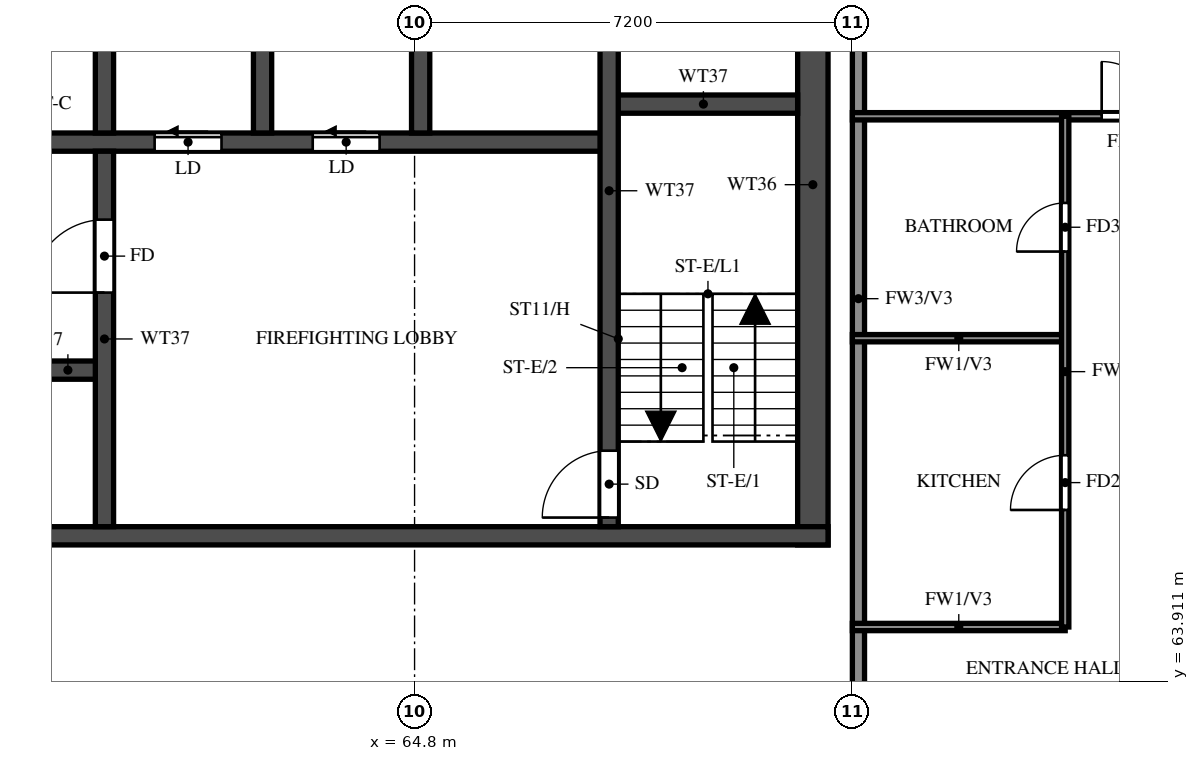
"""IFC4 building model, lengths in metres.
Left out: names, types, materials, properties, quantities, classifications, styles, units other than length and angle.
Written with IfcOpenShell. Run it as: python <this file> out.ifc"""

import sys

from ifc_helpers import new_model, si_unit, direction, frame, frame_2d, origin, place, context, subcontext, project, spatial, rectangle, extrude, element, fill, save


model = new_model("IFC4")
c1 = context("Model", 3, precision=1e-05, world=origin(), true_north=direction((0.0, 1.0)))
c2 = subcontext(c1, "Body", "Model", "MODEL_VIEW")
j1 = project(units=[si_unit("LENGTHUNIT", "METRE"), si_unit("PLANEANGLEUNIT", "RADIAN")], contexts=[c1])
p1 = place(None, origin())
s1 = spatial("IfcSite", under=j1, at=p1, CompositionType="ELEMENT")
p2 = place(p1, origin())
s2 = spatial("IfcBuilding", under=s1, at=p2, CompositionType="ELEMENT")
p3 = place(p2, frame((0.0, 0.0, 225.5)))
s3 = spatial("IfcBuildingStorey", under=s2, at=p3, CompositionType="ELEMENT", Elevation=225.5)
p4 = place(p3, frame((71.35, 66.15, 0.0), z_axis=(0.0, 0.0, 1.0), x_axis=(0.0, 1.0, 0.0)))
e1 = element("IfcWall", 1, at=p4, inside=s3, PredefinedType="SHEAR", context=c2, shape_type="SweptSolid", body=[
    extrude(rectangle(XDim=11.85, YDim=0.5, at=frame_2d((5.925, 0.0))), origin(), (0.0, 0.0, 1.0), 3.22),
])
p5 = place(p3, frame((29.2, 66.3, 0.0), z_axis=(0.0, 0.0, 1.0), x_axis=(1.0, 0.0, 0.0)))
e2 = element("IfcWall", 2, at=p5, inside=s3, PredefinedType="SHEAR", context=c2, shape_type="SweptSolid", body=[
    extrude(rectangle(XDim=42.4, YDim=0.3, at=frame_2d((21.2, 0.0))), origin(), (0.0, 0.0, 1.0), 3.22),
])
p6 = place(p5, frame((1.425, 0.0, 0.0)))
e3 = element("IfcOpeningElement", 3, at=p6, cuts=e2, PredefinedType="OPENING", context=c2, shape_type="SweptSolid", body=[
    extrude(rectangle(XDim=1.1, YDim=2.1, at=frame_2d((0.55, 1.05))), frame((0.0, 0.16, 0.0), z_axis=(0.0, -1.0, 0.0), x_axis=(1.0, 0.0, 0.0)), (0.0, 0.0, 1.0), 0.32),
])
p7 = place(p5, frame((4.2, 0.0, 0.0)))
e4 = element("IfcOpeningElement", 4, at=p7, cuts=e2, PredefinedType="OPENING", context=c2, shape_type="SweptSolid", body=[
    extrude(rectangle(XDim=1.8, YDim=2.1, at=frame_2d((0.9, 1.05))), frame((0.0, 0.16, 0.0), z_axis=(0.0, -1.0, 0.0), x_axis=(1.0, 0.0, 0.0)), (0.0, 0.0, 1.0), 0.32),
])
p8 = place(p3, frame((35.65, 69.025, 0.0), z_axis=(0.0, 0.0, 1.0), x_axis=(1.0, 0.0, 0.0)))
e5 = element("IfcWall", 5, at=p8, inside=s3, PredefinedType="SHEAR", context=c2, shape_type="SweptSolid", body=[
    extrude(rectangle(XDim=24.05, YDim=0.3, at=frame_2d((12.025, 0.0))), origin(), (0.0, 0.0, 1.0), 3.22),
])
p9 = place(p8, frame((0.975, 0.0, 0.0)))
e6 = element("IfcOpeningElement", 6, at=p9, cuts=e5, PredefinedType="OPENING", context=c2, shape_type="SweptSolid", body=[
    extrude(rectangle(XDim=1.1, YDim=2.1, at=frame_2d((0.55, 1.05))), frame((0.0, 0.16, 0.0), z_axis=(0.0, -1.0, 0.0), x_axis=(1.0, 0.0, 0.0)), (0.0, 0.0, 1.0), 0.32),
])
p10 = place(p8, frame((3.725, 0.0, 0.0)))
e7 = element("IfcOpeningElement", 7, at=p10, cuts=e5, PredefinedType="OPENING", context=c2, shape_type="SweptSolid", body=[
    extrude(rectangle(XDim=1.1, YDim=2.1, at=frame_2d((0.55, 1.05))), frame((0.0, 0.16, 0.0), z_axis=(0.0, -1.0, 0.0), x_axis=(1.0, 0.0, 0.0)), (0.0, 0.0, 1.0), 0.32),
])
p11 = place(p8, frame((6.475, 0.0, 0.0)))
e8 = element("IfcOpeningElement", 8, at=p11, cuts=e5, PredefinedType="OPENING", context=c2, shape_type="SweptSolid", body=[
    extrude(rectangle(XDim=1.1, YDim=2.1, at=frame_2d((0.55, 1.05))), frame((0.0, 0.16, 0.0), z_axis=(0.0, -1.0, 0.0), x_axis=(1.0, 0.0, 0.0)), (0.0, 0.0, 1.0), 0.32),
])
p12 = place(p8, frame((9.225, 0.0, 0.0)))
e9 = element("IfcOpeningElement", 9, at=p12, cuts=e5, PredefinedType="OPENING", context=c2, shape_type="SweptSolid", body=[
    extrude(rectangle(XDim=1.1, YDim=2.1, at=frame_2d((0.55, 1.05))), frame((0.0, 0.16, 0.0), z_axis=(0.0, -1.0, 0.0), x_axis=(1.0, 0.0, 0.0)), (0.0, 0.0, 1.0), 0.32),
])
p13 = place(p8, frame((11.975, 0.0, 0.0)))
e10 = element("IfcOpeningElement", 10, at=p13, cuts=e5, PredefinedType="OPENING", context=c2, shape_type="SweptSolid", body=[
    extrude(rectangle(XDim=1.1, YDim=2.1, at=frame_2d((0.55, 1.05))), frame((0.0, 0.16, 0.0), z_axis=(0.0, -1.0, 0.0), x_axis=(1.0, 0.0, 0.0)), (0.0, 0.0, 1.0), 0.32),
])
p14 = place(p8, frame((14.725, 0.0, 0.0)))
e11 = element("IfcOpeningElement", 11, at=p14, cuts=e5, PredefinedType="OPENING", context=c2, shape_type="SweptSolid", body=[
    extrude(rectangle(XDim=1.1, YDim=2.1, at=frame_2d((0.55, 1.05))), frame((0.0, 0.16, 0.0), z_axis=(0.0, -1.0, 0.0), x_axis=(1.0, 0.0, 0.0)), (0.0, 0.0, 1.0), 0.32),
])
p15 = place(p8, frame((17.6, 0.0, 0.0)))
e12 = element("IfcOpeningElement", 12, at=p15, cuts=e5, PredefinedType="OPENING", context=c2, shape_type="SweptSolid", body=[
    extrude(rectangle(XDim=1.1, YDim=2.1, at=frame_2d((0.55, 1.05))), frame((0.0, 0.16, 0.0), z_axis=(0.0, -1.0, 0.0), x_axis=(1.0, 0.0, 0.0)), (0.0, 0.0, 1.0), 0.32),
])
p16 = place(p8, frame((20.6, 0.0, 0.0)))
e13 = element("IfcOpeningElement", 13, at=p16, cuts=e5, PredefinedType="OPENING", context=c2, shape_type="SweptSolid", body=[
    extrude(rectangle(XDim=1.1, YDim=2.1, at=frame_2d((0.55, 1.05))), frame((0.0, 0.16, 0.0), z_axis=(0.0, -1.0, 0.0), x_axis=(1.0, 0.0, 0.0)), (0.0, 0.0, 1.0), 0.32),
])
p17 = place(p3, frame((32.8, 72.775, 0.0), z_axis=(0.0, 0.0, 1.0), x_axis=(1.0, 0.0, 0.0)))
e14 = element("IfcWall", 14, at=p17, inside=s3, PredefinedType="SHEAR", context=c2, shape_type="SweptSolid", body=[
    extrude(rectangle(XDim=35.2, YDim=0.3, at=frame_2d((17.6, 0.0))), origin(), (0.0, 0.0, 1.0), 3.22),
])
p18 = place(p17, frame((19.8, 0.0, 0.0)))
e15 = element("IfcOpeningElement", 15, at=p18, cuts=e14, PredefinedType="OPENING", context=c2, shape_type="SweptSolid", body=[
    extrude(rectangle(XDim=1.1, YDim=2.1, at=frame_2d((0.55, 1.05))), frame((0.0, 0.16, 0.0), z_axis=(0.0, -1.0, 0.0), x_axis=(1.0, 0.0, 0.0)), (0.0, 0.0, 1.0), 0.32),
])
p19 = place(p17, frame((27.725, 0.0, 0.0)))
e16 = element("IfcOpeningElement", 16, at=p19, cuts=e14, PredefinedType="OPENING", context=c2, shape_type="SweptSolid", body=[
    extrude(rectangle(XDim=1.1, YDim=2.1, at=frame_2d((0.55, 1.05))), frame((0.0, 0.16, 0.0), z_axis=(0.0, -1.0, 0.0), x_axis=(1.0, 0.0, 0.0)), (0.0, 0.0, 1.0), 0.32),
])
p20 = place(p17, frame((30.325, 0.0, 0.0)))
e17 = element("IfcOpeningElement", 17, at=p20, cuts=e14, PredefinedType="OPENING", context=c2, shape_type="SweptSolid", body=[
    extrude(rectangle(XDim=1.1, YDim=2.1, at=frame_2d((0.55, 1.05))), frame((0.0, 0.16, 0.0), z_axis=(0.0, -1.0, 0.0), x_axis=(1.0, 0.0, 0.0)), (0.0, 0.0, 1.0), 0.32),
])
p21 = place(p17, frame((3.825, 0.0, 0.0)))
e18 = element("IfcOpeningElement", 18, at=p21, cuts=e14, PredefinedType="OPENING", context=c2, shape_type="SweptSolid", body=[
    extrude(rectangle(XDim=1.1, YDim=2.1, at=frame_2d((0.55, 1.05))), frame((0.0, 0.16, 0.0), z_axis=(0.0, -1.0, 0.0), x_axis=(1.0, 0.0, 0.0)), (0.0, 0.0, 1.0), 0.32),
])
p22 = place(p17, frame((6.575, 0.0, 0.0)))
e19 = element("IfcOpeningElement", 19, at=p22, cuts=e14, PredefinedType="OPENING", context=c2, shape_type="SweptSolid", body=[
    extrude(rectangle(XDim=1.1, YDim=2.1, at=frame_2d((0.55, 1.05))), frame((0.0, 0.16, 0.0), z_axis=(0.0, -1.0, 0.0), x_axis=(1.0, 0.0, 0.0)), (0.0, 0.0, 1.0), 0.32),
])
p23 = place(p17, frame((9.325, 0.0, 0.0)))
e20 = element("IfcOpeningElement", 20, at=p23, cuts=e14, PredefinedType="OPENING", context=c2, shape_type="SweptSolid", body=[
    extrude(rectangle(XDim=1.1, YDim=2.1, at=frame_2d((0.55, 1.05))), frame((0.0, 0.16, 0.0), z_axis=(0.0, -1.0, 0.0), x_axis=(1.0, 0.0, 0.0)), (0.0, 0.0, 1.0), 0.32),
])
p24 = place(p17, frame((12.075, 0.0, 0.0)))
e21 = element("IfcOpeningElement", 21, at=p24, cuts=e14, PredefinedType="OPENING", context=c2, shape_type="SweptSolid", body=[
    extrude(rectangle(XDim=1.1, YDim=2.1, at=frame_2d((0.55, 1.05))), frame((0.0, 0.16, 0.0), z_axis=(0.0, -1.0, 0.0), x_axis=(1.0, 0.0, 0.0)), (0.0, 0.0, 1.0), 0.32),
])
p25 = place(p17, frame((14.825, 0.0, 0.0)))
e22 = element("IfcOpeningElement", 22, at=p25, cuts=e14, PredefinedType="OPENING", context=c2, shape_type="SweptSolid", body=[
    extrude(rectangle(XDim=1.1, YDim=2.1, at=frame_2d((0.55, 1.05))), frame((0.0, 0.16, 0.0), z_axis=(0.0, -1.0, 0.0), x_axis=(1.0, 0.0, 0.0)), (0.0, 0.0, 1.0), 0.32),
])
p26 = place(p17, frame((17.575, 0.0, 0.0)))
e23 = element("IfcOpeningElement", 23, at=p26, cuts=e14, PredefinedType="OPENING", context=c2, shape_type="SweptSolid", body=[
    extrude(rectangle(XDim=1.1, YDim=2.1, at=frame_2d((0.55, 1.05))), frame((0.0, 0.16, 0.0), z_axis=(0.0, -1.0, 0.0), x_axis=(1.0, 0.0, 0.0)), (0.0, 0.0, 1.0), 0.32),
])
p27 = place(p17, frame((0.95, 0.0, 0.0)))
e24 = element("IfcOpeningElement", 24, at=p27, cuts=e14, PredefinedType="OPENING", context=c2, shape_type="SweptSolid", body=[
    extrude(rectangle(XDim=1.1, YDim=2.1, at=frame_2d((0.55, 1.05))), frame((0.0, 0.16, 0.0), z_axis=(0.0, -1.0, 0.0), x_axis=(1.0, 0.0, 0.0)), (0.0, 0.0, 1.0), 0.32),
])
p28 = place(p3, frame((68.0, 73.4, 0.0), z_axis=(0.0, 0.0, 1.0), x_axis=(1.0, 0.0, 0.0)))
e25 = element("IfcWall", 25, at=p28, inside=s3, PredefinedType="SHEAR", context=c2, shape_type="SweptSolid", body=[
    extrude(rectangle(XDim=3.1, YDim=0.3, at=frame_2d((1.55, 0.0))), origin(), (0.0, 0.0, 1.0), 3.22),
])
p29 = place(p3, frame((68.0, 66.45, 0.0), z_axis=(0.0, 0.0, 1.0), x_axis=(0.0, 1.0, 0.0)))
e26 = element("IfcWall", 26, at=p29, inside=s3, PredefinedType="SHEAR", context=c2, shape_type="SweptSolid", body=[
    extrude(rectangle(XDim=11.05, YDim=0.3, at=frame_2d((5.525, 0.0))), origin(), (0.0, 0.0, 1.0), 3.22),
])
p30 = place(p29, frame((0.15, 0.0, 0.0)))
e27 = element("IfcOpeningElement", 27, at=p30, cuts=e26, PredefinedType="OPENING", context=c2, shape_type="SweptSolid", body=[
    extrude(rectangle(XDim=1.1, YDim=2.1, at=frame_2d((0.55, 1.05))), frame((0.0, 0.16, 0.0), z_axis=(0.0, -1.0, 0.0), x_axis=(1.0, 0.0, 0.0)), (0.0, 0.0, 1.0), 0.32),
])
p31 = place(p3, frame((59.7, 66.45, 0.0), z_axis=(0.0, 0.0, 1.0), x_axis=(0.0, 1.0, 0.0)))
e28 = element("IfcWall", 28, at=p31, inside=s3, PredefinedType="SHEAR", context=c2, shape_type="SweptSolid", body=[
    extrude(rectangle(XDim=6.175, YDim=0.3, at=frame_2d((3.087, 0.0))), origin(), (0.0, 0.0, 1.0), 3.22),
])
p32 = place(p31, frame((3.85, 0.0, 0.0)))
e29 = element("IfcOpeningElement", 29, at=p32, cuts=e28, PredefinedType="OPENING", context=c2, shape_type="SweptSolid", body=[
    extrude(rectangle(XDim=1.2, YDim=2.1, at=frame_2d((0.6, 1.05))), frame((0.0, 0.16, 0.0), z_axis=(0.0, -1.0, 0.0), x_axis=(1.0, 0.0, 0.0)), (0.0, 0.0, 1.0), 0.32),
])
for number, where, z_axis, x_axis in (
    (30, (59.7, 72.925, 0.0), (0.0, 0.0, 1.0), (0.0, 1.0, 0.0)),
    (31, (62.3, 72.925, 0.0), (0.0, 0.0, 1.0), (0.0, 1.0, 0.0)),
    (32, (64.9, 72.925, 0.0), (0.0, 0.0, 1.0), (0.0, 1.0, 0.0)),
):
    element("IfcWall", number, at=place(p3, frame(where, z_axis=z_axis, x_axis=x_axis)), inside=s3, PredefinedType="SHEAR", context=c2, shape_type="SweptSolid", body=[
        extrude(rectangle(XDim=2.95, YDim=0.3, at=frame_2d((1.475, 0.0))), origin(), (0.0, 0.0, 1.0), 3.22),
    ])
p33 = place(p3, frame((72.1, 62.4, 0.0), z_axis=(0.0, 0.0, 1.0), x_axis=(0.0, 1.0, 0.0)))
e33 = element("IfcWall", 33, at=p33, inside=s3, PredefinedType="SOLIDWALL", context=c2, shape_type="SweptSolid", body=[
    extrude(rectangle(XDim=15.6, YDim=0.2, at=frame_2d((7.8, 0.0))), origin(), (0.0, 0.0, 1.0), 3.22),
])
for number, where, z_axis, x_axis in (
    (34, (72.0, 64.8, 0.0), (0.0, 0.0, 1.0), (1.0, 0.0, 0.0)),
    (35, (72.0, 69.55, 0.0), (0.0, 0.0, 1.0), (1.0, 0.0, 0.0)),
):
    element("IfcWall", number, at=place(p3, frame(where, z_axis=z_axis, x_axis=x_axis)), inside=s3, PredefinedType="PARTITIONING", context=c2, shape_type="SweptSolid", body=[
        extrude(rectangle(XDim=3.5, YDim=0.12, at=frame_2d((1.75, 0.0))), origin(), (0.0, 0.0, 1.0), 3.22),
    ])
p34 = place(p3, frame((72.0, 73.2, 0.0), z_axis=(0.0, 0.0, 1.0), x_axis=(1.0, 0.0, 0.0)))
e36 = element("IfcWall", 36, at=p34, inside=s3, PredefinedType="PARTITIONING", context=c2, shape_type="SweptSolid", body=[
    extrude(rectangle(XDim=10.275, YDim=0.12, at=frame_2d((5.137, 0.0))), origin(), (0.0, 0.0, 1.0), 2.32),
])
p35 = place(p34, frame((4.1, 0.0, 0.0)))
e37 = element("IfcOpeningElement", 37, at=p35, cuts=e36, PredefinedType="OPENING", context=c2, shape_type="SweptSolid", body=[
    extrude(rectangle(XDim=0.9, YDim=2.1, at=frame_2d((0.45, 1.05))), frame((0.0, 0.07, 0.0), z_axis=(0.0, -1.0, 0.0), x_axis=(1.0, 0.0, 0.0)), (0.0, 0.0, 1.0), 0.14),
])
p36 = place(p3, frame((75.5, 64.8, 0.0), z_axis=(0.0, 0.0, 1.0), x_axis=(0.0, 1.0, 0.0)))
e38 = element("IfcWall", 38, at=p36, inside=s3, PredefinedType="PARTITIONING", context=c2, shape_type="SweptSolid", body=[
    extrude(rectangle(XDim=8.4, YDim=0.12, at=frame_2d((4.2, 0.0))), origin(), (0.0, 0.0, 1.0), 3.22),
])
p37 = place(p36, frame((1.925, 0.0, 0.0)))
e39 = element("IfcOpeningElement", 39, at=p37, cuts=e38, PredefinedType="OPENING", context=c2, shape_type="SweptSolid", body=[
    extrude(rectangle(XDim=0.9, YDim=2.1, at=frame_2d((0.45, 1.05))), frame((0.0, 0.07, 0.0), z_axis=(0.0, -1.0, 0.0), x_axis=(1.0, 0.0, 0.0)), (0.0, 0.0, 1.0), 0.14),
])
p38 = place(p36, frame((6.175, 0.0, 0.0)))
e40 = element("IfcOpeningElement", 40, at=p38, cuts=e38, PredefinedType="OPENING", context=c2, shape_type="SweptSolid", body=[
    extrude(rectangle(XDim=0.8, YDim=2.1, at=frame_2d((0.4, 1.05))), frame((0.0, 0.07, 0.0), z_axis=(0.0, -1.0, 0.0), x_axis=(1.0, 0.0, 0.0)), (0.0, 0.0, 1.0), 0.14),
])
p39 = place(p30, origin())
e41 = element("IfcDoor", 41, at=p39, inside=s3, OperationType="SINGLE_SWING_RIGHT", PredefinedType="DOOR", context=c2, shape_type="SweptSolid", body=[
    extrude(rectangle(XDim=1.1, YDim=2.1, at=frame_2d((0.55, 1.05))), frame((0.0, 0.025, 0.0), z_axis=(0.0, -1.0, 0.0), x_axis=(1.0, 0.0, 0.0)), (0.0, 0.0, 1.0), 0.05),
])
fill(e27, e41)
p40 = place(p32, origin())
e42 = element("IfcDoor", 42, at=p40, inside=s3, OperationType="SINGLE_SWING_LEFT", PredefinedType="DOOR", context=c2, shape_type="SweptSolid", body=[
    extrude(rectangle(XDim=1.2, YDim=2.1, at=frame_2d((0.6, 1.05))), frame((0.0, 0.025, 0.0), z_axis=(0.0, -1.0, 0.0), x_axis=(1.0, 0.0, 0.0)), (0.0, 0.0, 1.0), 0.05),
])
fill(e29, e42)
p41 = place(p19, origin())
e43 = element("IfcDoor", 43, at=p41, inside=s3, OperationType="SLIDING_TO_LEFT", PredefinedType="DOOR", context=c2, shape_type="SweptSolid", body=[
    extrude(rectangle(XDim=1.1, YDim=2.1, at=frame_2d((0.55, 1.05))), frame((0.0, 0.025, 0.0), z_axis=(0.0, -1.0, 0.0), x_axis=(1.0, 0.0, 0.0)), (0.0, 0.0, 1.0), 0.05),
])
fill(e16, e43)
p42 = place(p20, origin())
e44 = element("IfcDoor", 44, at=p42, inside=s3, OperationType="SLIDING_TO_LEFT", PredefinedType="DOOR", context=c2, shape_type="SweptSolid", body=[
    extrude(rectangle(XDim=1.1, YDim=2.1, at=frame_2d((0.55, 1.05))), frame((0.0, 0.025, 0.0), z_axis=(0.0, -1.0, 0.0), x_axis=(1.0, 0.0, 0.0)), (0.0, 0.0, 1.0), 0.05),
])
fill(e17, e44)
p43 = place(p35, origin())
e45 = element("IfcDoor", 45, at=p43, inside=s3, OperationType="SINGLE_SWING_RIGHT", PredefinedType="DOOR", context=c2, shape_type="SweptSolid", body=[
    extrude(rectangle(XDim=0.9, YDim=2.1, at=frame_2d((0.45, 1.05))), frame((0.0, 0.025, 0.0), z_axis=(0.0, -1.0, 0.0), x_axis=(1.0, 0.0, 0.0)), (0.0, 0.0, 1.0), 0.05),
])
fill(e37, e45)
p44 = place(p37, origin())
e46 = element("IfcDoor", 46, at=p44, inside=s3, OperationType="SINGLE_SWING_LEFT", PredefinedType="DOOR", context=c2, shape_type="SweptSolid", body=[
    extrude(rectangle(XDim=0.9, YDim=2.1, at=frame_2d((0.45, 1.05))), frame((0.0, 0.025, 0.0), z_axis=(0.0, -1.0, 0.0), x_axis=(1.0, 0.0, 0.0)), (0.0, 0.0, 1.0), 0.05),
])
fill(e39, e46)
p45 = place(p38, origin())
e47 = element("IfcDoor", 47, at=p45, inside=s3, OperationType="SINGLE_SWING_LEFT", PredefinedType="DOOR", context=c2, shape_type="SweptSolid", body=[
    extrude(rectangle(XDim=0.8, YDim=2.1, at=frame_2d((0.4, 1.05))), frame((0.0, 0.025, 0.0), z_axis=(0.0, -1.0, 0.0), x_axis=(1.0, 0.0, 0.0)), (0.0, 0.0, 1.0), 0.05),
])
fill(e40, e47)
save(model, sys.argv[1])
